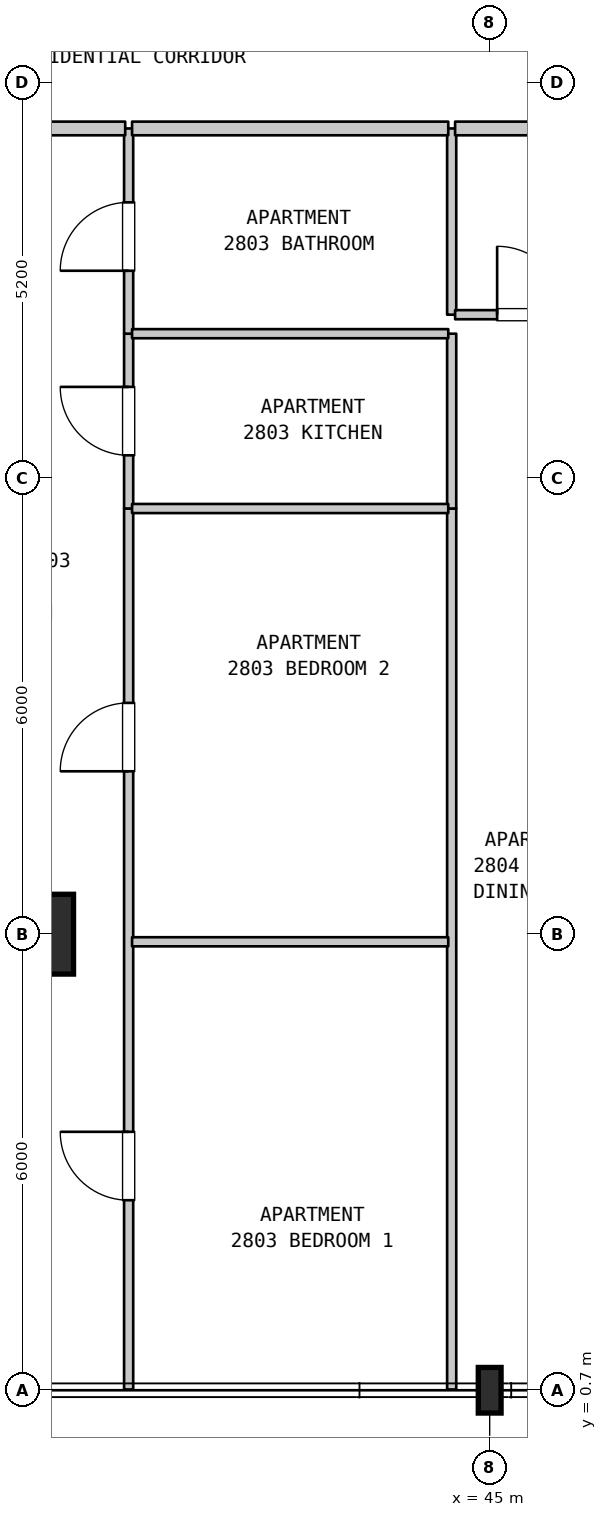
"""IFC4 building model, lengths in metres.
Left out: names, types, materials, properties, quantities, classifications, styles, units other than length and angle.
Written with IfcOpenShell. Run it as: python <this file> out.ifc"""

import sys

from ifc_helpers import new_model, si_unit, direction, frame, frame_2d, origin, origin_2d, place, context, subcontext, project, spatial, rectangle, i_section, extrude, element, fill, save


model = new_model("IFC4")
c1 = context("Model", 3, precision=1e-05, world=origin(), true_north=direction((0.0, 1.0)))
c2 = subcontext(c1, "Body", "Model", "MODEL_VIEW")
j1 = project(units=[si_unit("LENGTHUNIT", "METRE"), si_unit("PLANEANGLEUNIT", "RADIAN")], contexts=[c1])
p1 = place(None, origin())
s1 = spatial("IfcSite", under=j1, at=p1, CompositionType="ELEMENT")
p2 = place(p1, origin())
s2 = spatial("IfcBuilding", under=s1, at=p2, CompositionType="ELEMENT")
p3 = place(p2, frame((0.0, 0.0, 116.8)))
s3 = spatial("IfcBuildingStorey", under=s2, at=p3, CompositionType="ELEMENT", Elevation=116.8)
p4 = place(p3, frame((39.0, 6.7, 0.0), z_axis=(0.0, 0.0, 1.0), x_axis=(1.0, 0.0, 0.0)))
e1 = element("IfcColumn", 1, at=p4, inside=s3, PredefinedType="COLUMN", context=c2, shape_type="SweptSolid", body=[
    extrude(rectangle(XDim=1.05, YDim=1.05, at=origin_2d()), origin(), (0.0, 0.0, 1.0), 3.7),
])
p5 = place(p3, frame((45.0, 0.7, 0.0), z_axis=(0.0, 0.0, 1.0), x_axis=(1.0, 0.0, 0.0)))
e2 = element("IfcColumn", 2, at=p5, inside=s3, PredefinedType="COLUMN", context=c2, shape_type="SweptSolid", body=[
    extrude(i_section(OverallWidth=0.3, OverallDepth=0.6, WebThickness=0.015, FlangeThickness=0.03, FilletRadius=0.027, at=origin_2d()), origin(), (0.0, 0.0, 1.0), 3.7),
])
p6 = place(p3, frame((40.25, 0.71, 0.0), z_axis=(0.0, 0.0, 1.0), x_axis=(0.0, 1.0, 0.0)))
e3 = element("IfcWall", 3, at=p6, inside=s3, PredefinedType="PARTITIONING", context=c2, shape_type="SweptSolid", body=[
    extrude(rectangle(XDim=11.59, YDim=0.12, at=frame_2d((5.795, 0.0))), origin(), (0.0, 0.0, 1.0), 3.38),
])
p7 = place(p6, frame((2.49, 0.0, 0.0)))
e4 = element("IfcOpeningElement", 4, at=p7, cuts=e3, PredefinedType="OPENING", context=c2, shape_type="SweptSolid", body=[
    extrude(rectangle(XDim=0.9, YDim=2.15, at=frame_2d((0.45, 1.075))), frame((0.0, 0.07, 0.0), z_axis=(0.0, -1.0, 0.0), x_axis=(1.0, 0.0, 0.0)), (0.0, 0.0, 1.0), 0.14),
])
p8 = place(p6, frame((8.133, 0.0, 0.0)))
e5 = element("IfcOpeningElement", 5, at=p8, cuts=e3, PredefinedType="OPENING", context=c2, shape_type="SweptSolid", body=[
    extrude(rectangle(XDim=0.9, YDim=2.15, at=frame_2d((0.45, 1.075))), frame((0.0, 0.07, 0.0), z_axis=(0.0, -1.0, 0.0), x_axis=(1.0, 0.0, 0.0)), (0.0, 0.0, 1.0), 0.14),
])
p9 = place(p3, frame((40.25, 12.3, 0.0), z_axis=(0.0, 0.0, 1.0), x_axis=(0.0, 1.0, 0.0)))
e6 = element("IfcWall", 6, at=p9, inside=s3, PredefinedType="PARTITIONING", context=c2, shape_type="SweptSolid", body=[
    extrude(rectangle(XDim=2.3, YDim=0.12, at=frame_2d((1.15, 0.0))), origin(), (0.0, 0.0, 1.0), 3.38),
])
p10 = place(p9, frame((0.7, 0.0, 0.0)))
e7 = element("IfcOpeningElement", 7, at=p10, cuts=e6, PredefinedType="OPENING", context=c2, shape_type="SweptSolid", body=[
    extrude(rectangle(XDim=0.9, YDim=2.15, at=frame_2d((0.45, 1.075))), frame((0.0, 0.07, 0.0), z_axis=(0.0, -1.0, 0.0), x_axis=(1.0, 0.0, 0.0)), (0.0, 0.0, 1.0), 0.14),
])
p11 = place(p3, frame((40.25, 14.6, 0.0), z_axis=(0.0, 0.0, 1.0), x_axis=(0.0, 1.0, 0.0)))
e8 = element("IfcWall", 8, at=p11, inside=s3, PredefinedType="PARTITIONING", context=c2, shape_type="SweptSolid", body=[
    extrude(rectangle(XDim=2.7, YDim=0.12, at=frame_2d((1.35, 0.0))), origin(), (0.0, 0.0, 1.0), 3.38),
])
p12 = place(p11, frame((0.828, 0.0, 0.0)))
e9 = element("IfcOpeningElement", 9, at=p12, cuts=e8, PredefinedType="OPENING", context=c2, shape_type="SweptSolid", body=[
    extrude(rectangle(XDim=0.9, YDim=2.1, at=frame_2d((0.45, 1.05))), frame((0.0, 0.07, 0.0), z_axis=(0.0, -1.0, 0.0), x_axis=(1.0, 0.0, 0.0)), (0.0, 0.0, 1.0), 0.14),
])
p13 = place(p3, frame((44.5, 0.71, 0.0), z_axis=(0.0, 0.0, 1.0), x_axis=(0.0, 1.0, 0.0)))
e10 = element("IfcWall", 10, at=p13, inside=s3, PredefinedType="PARTITIONING", context=c2, shape_type="SweptSolid", body=[
    extrude(rectangle(XDim=11.59, YDim=0.12, at=frame_2d((5.795, 0.0))), origin(), (0.0, 0.0, 1.0), 3.38),
])
p14 = place(p3, frame((44.5, 12.3, 0.0), z_axis=(0.0, 0.0, 1.0), x_axis=(0.0, 1.0, 0.0)))
e11 = element("IfcWall", 11, at=p14, inside=s3, PredefinedType="PARTITIONING", context=c2, shape_type="SweptSolid", body=[
    extrude(rectangle(XDim=2.3, YDim=0.12, at=frame_2d((1.15, 0.0))), origin(), (0.0, 0.0, 1.0), 3.38),
])
p15 = place(p3, frame((44.5, 14.85, 0.0), z_axis=(0.0, 0.0, 1.0), x_axis=(0.0, 1.0, 0.0)))
e12 = element("IfcWall", 12, at=p15, inside=s3, PredefinedType="PARTITIONING", context=c2, shape_type="SweptSolid", body=[
    extrude(rectangle(XDim=2.45, YDim=0.12, at=frame_2d((1.225, 0.0))), origin(), (0.0, 0.0, 1.0), 3.38),
])
p16 = place(p3, frame((40.295, 6.6, 0.0), z_axis=(0.0, 0.0, 1.0), x_axis=(1.0, 0.0, 0.0)))
e13 = element("IfcWall", 13, at=p16, inside=s3, PredefinedType="PARTITIONING", context=c2, shape_type="SweptSolid", body=[
    extrude(rectangle(XDim=4.16, YDim=0.12, at=frame_2d((2.08, 0.0))), origin(), (0.0, 0.0, 1.0), 2.78),
])
for number, where, z_axis, x_axis in (
    (14, (40.295, 12.3, 0.0), (0.0, 0.0, 1.0), (1.0, 0.0, 0.0)),
    (15, (40.295, 14.6, 0.0), (0.0, 0.0, 1.0), (1.0, 0.0, 0.0)),
):
    element("IfcWall", number, at=place(p3, frame(where, z_axis=z_axis, x_axis=x_axis)), inside=s3, PredefinedType="PARTITIONING", context=c2, shape_type="SweptSolid", body=[
        extrude(rectangle(XDim=4.16, YDim=0.12, at=frame_2d((2.08, 0.0))), origin(), (0.0, 0.0, 1.0), 3.38),
    ])
p17 = place(p3, frame((44.545, 14.85, 0.0), z_axis=(0.0, 0.0, 1.0), x_axis=(1.0, 0.0, 0.0)))
e16 = element("IfcWall", 16, at=p17, inside=s3, PredefinedType="PARTITIONING", context=c2, shape_type="SweptSolid", body=[
    extrude(rectangle(XDim=2.16, YDim=0.12, at=frame_2d((1.08, 0.0))), origin(), (0.0, 0.0, 1.0), 3.38),
])
p18 = place(p17, frame((0.553, 0.0, 0.0)))
e17 = element("IfcOpeningElement", 17, at=p18, cuts=e16, PredefinedType="OPENING", context=c2, shape_type="SweptSolid", body=[
    extrude(rectangle(XDim=0.9, YDim=2.15, at=frame_2d((0.45, 1.075))), frame((0.0, 0.07, 0.0), z_axis=(0.0, -1.0, 0.0), x_axis=(1.0, 0.0, 0.0)), (0.0, 0.0, 1.0), 0.14),
])
p19 = place(p3, frame((36.695, 17.3, 0.0), z_axis=(0.0, 0.0, 1.0), x_axis=(1.0, 0.0, 0.0)))
e18 = element("IfcWall", 18, at=p19, inside=s3, PredefinedType="STANDARD", context=c2, shape_type="SweptSolid", body=[
    extrude(rectangle(XDim=3.51, YDim=0.18, at=frame_2d((1.755, 0.0))), origin(), (0.0, 0.0, 1.0), 3.38),
])
p20 = place(p19, frame((1.185, 0.0, 0.0)))
e19 = element("IfcOpeningElement", 19, at=p20, cuts=e18, PredefinedType="OPENING", context=c2, shape_type="SweptSolid", body=[
    extrude(rectangle(XDim=1.0, YDim=2.15, at=frame_2d((0.5, 1.075))), frame((0.0, 0.1, 0.0), z_axis=(0.0, -1.0, 0.0), x_axis=(1.0, 0.0, 0.0)), (0.0, 0.0, 1.0), 0.2),
])
p21 = place(p3, frame((40.295, 17.3, 0.0), z_axis=(0.0, 0.0, 1.0), x_axis=(1.0, 0.0, 0.0)))
e20 = element("IfcWall", 20, at=p21, inside=s3, PredefinedType="STANDARD", context=c2, shape_type="SweptSolid", body=[
    extrude(rectangle(XDim=4.16, YDim=0.18, at=frame_2d((2.08, 0.0))), origin(), (0.0, 0.0, 1.0), 3.38),
])
p22 = place(p3, frame((44.545, 17.3, 0.0), z_axis=(0.0, 0.0, 1.0), x_axis=(1.0, 0.0, 0.0)))
e21 = element("IfcWall", 21, at=p22, inside=s3, PredefinedType="STANDARD", context=c2, shape_type="SweptSolid", body=[
    extrude(rectangle(XDim=4.68, YDim=0.18, at=frame_2d((2.34, 0.0))), origin(), (0.0, 0.0, 1.0), 3.38),
])
p23 = place(p22, frame((1.769, 0.0, 0.0)))
e22 = element("IfcOpeningElement", 22, at=p23, cuts=e21, PredefinedType="OPENING", context=c2, shape_type="SweptSolid", body=[
    extrude(rectangle(XDim=1.0, YDim=2.15, at=frame_2d((0.5, 1.075))), frame((0.0, 0.1, 0.0), z_axis=(0.0, -1.0, 0.0), x_axis=(1.0, 0.0, 0.0)), (0.0, 0.0, 1.0), 0.2),
])
p24 = place(p7, origin())
e23 = element("IfcDoor", 23, at=p24, inside=s3, OperationType="SINGLE_SWING_RIGHT", PredefinedType="DOOR", context=c2, shape_type="SweptSolid", body=[
    extrude(rectangle(XDim=0.9, YDim=2.15, at=frame_2d((0.45, 1.075))), frame((0.0, 0.025, 0.0), z_axis=(0.0, -1.0, 0.0), x_axis=(1.0, 0.0, 0.0)), (0.0, 0.0, 1.0), 0.05),
])
fill(e4, e23)
p25 = place(p8, origin())
e24 = element("IfcDoor", 24, at=p25, inside=s3, OperationType="SINGLE_SWING_LEFT", PredefinedType="DOOR", context=c2, shape_type="SweptSolid", body=[
    extrude(rectangle(XDim=0.9, YDim=2.15, at=frame_2d((0.45, 1.075))), frame((0.0, 0.025, 0.0), z_axis=(0.0, -1.0, 0.0), x_axis=(1.0, 0.0, 0.0)), (0.0, 0.0, 1.0), 0.05),
])
fill(e5, e24)
p26 = place(p10, origin())
e25 = element("IfcDoor", 25, at=p26, inside=s3, OperationType="SINGLE_SWING_RIGHT", PredefinedType="DOOR", context=c2, shape_type="SweptSolid", body=[
    extrude(rectangle(XDim=0.9, YDim=2.15, at=frame_2d((0.45, 1.075))), frame((0.0, 0.025, 0.0), z_axis=(0.0, -1.0, 0.0), x_axis=(1.0, 0.0, 0.0)), (0.0, 0.0, 1.0), 0.05),
])
fill(e7, e25)
p27 = place(p12, origin())
e26 = element("IfcDoor", 26, at=p27, inside=s3, OperationType="SINGLE_SWING_LEFT", PredefinedType="DOOR", context=c2, shape_type="SweptSolid", body=[
    extrude(rectangle(XDim=0.9, YDim=2.1, at=frame_2d((0.45, 1.05))), frame((0.0, 0.025, 0.0), z_axis=(0.0, -1.0, 0.0), x_axis=(1.0, 0.0, 0.0)), (0.0, 0.0, 1.0), 0.05),
])
fill(e9, e26)
p28 = place(p18, origin())
e27 = element("IfcDoor", 27, at=p28, inside=s3, OperationType="SINGLE_SWING_LEFT", PredefinedType="DOOR", context=c2, shape_type="SweptSolid", body=[
    extrude(rectangle(XDim=0.9, YDim=2.15, at=frame_2d((0.45, 1.075))), frame((0.0, 0.025, 0.0), z_axis=(0.0, -1.0, 0.0), x_axis=(1.0, 0.0, 0.0)), (0.0, 0.0, 1.0), 0.05),
])
fill(e17, e27)
save(model, sys.argv[1])
